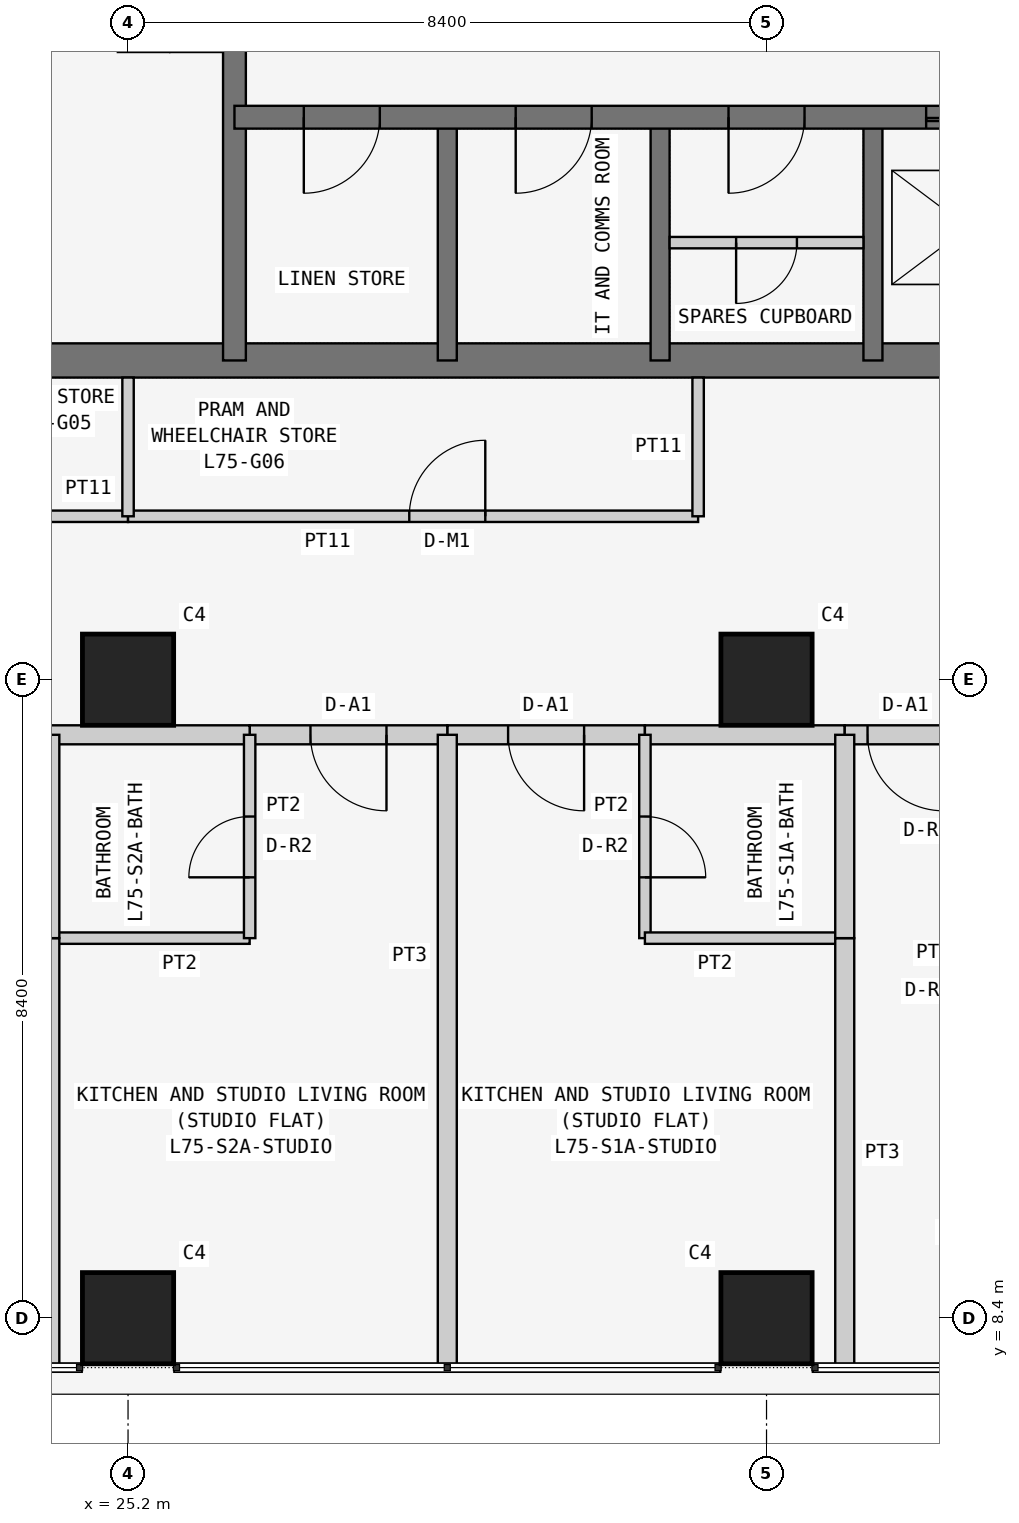
"""IFC4 building model, lengths in metres.
Left out: names, types, materials, properties, quantities, classifications, styles, units other than length and angle.
Written with IfcOpenShell. Run it as: python <this file> out.ifc"""

import sys

from ifc_helpers import new_model, si_unit, direction, frame, frame_2d, origin, origin_2d, place, context, subcontext, project, spatial, rectangle, extrude, element, fill, save


model = new_model("IFC4")
c1 = context("Model", 3, precision=1e-05, world=origin(), true_north=direction((0.0, 1.0)))
c2 = subcontext(c1, "Body", "Model", "MODEL_VIEW")
j1 = project(units=[si_unit("LENGTHUNIT", "METRE"), si_unit("PLANEANGLEUNIT", "RADIAN")], contexts=[c1])
p1 = place(None, origin())
s1 = spatial("IfcSite", under=j1, at=p1, CompositionType="ELEMENT")
p2 = place(p1, origin())
s2 = spatial("IfcBuilding", under=s1, at=p2, CompositionType="ELEMENT")
p3 = place(p2, frame((0.0, 0.0, 286.5)))
s3 = spatial("IfcBuildingStorey", under=s2, at=p3, CompositionType="ELEMENT", Elevation=286.5)
for number, where, z_axis, x_axis in (
    (1, (25.2, 8.4, 0.0), (0.0, 0.0, 1.0), (1.0, 0.0, 0.0)),
    (2, (25.2, 16.8, 0.0), (0.0, 0.0, 1.0), (1.0, 0.0, 0.0)),
    (3, (33.6, 8.4, 0.0), (0.0, 0.0, 1.0), (1.0, 0.0, 0.0)),
    (4, (33.6, 16.8, 0.0), (0.0, 0.0, 1.0), (1.0, 0.0, 0.0)),
):
    element("IfcColumn", number, at=place(p3, frame(where, z_axis=z_axis, x_axis=x_axis)), inside=s3, PredefinedType="COLUMN", context=c2, shape_type="SweptSolid", body=[
        extrude(rectangle(XDim=1.2, YDim=1.2, at=origin_2d()), origin(), (0.0, 0.0, 1.0), 3.6),
    ])
p4 = place(p3, frame((21.0, 21.0, 0.0), z_axis=(0.0, 0.0, 1.0), x_axis=(1.0, 0.0, 0.0)))
e5 = element("IfcWall", 5, at=p4, inside=s3, PredefinedType="SHEAR", context=c2, shape_type="SweptSolid", body=[
    extrude(rectangle(XDim=17.025, YDim=0.45, at=frame_2d((8.512, 0.0))), origin(), (0.0, 0.0, 1.0), 3.6),
])
p5 = place(p3, frame((26.6, 21.0, 0.0), z_axis=(0.0, 0.0, 1.0), x_axis=(0.0, 1.0, 0.0)))
e6 = element("IfcWall", 6, at=p5, inside=s3, PredefinedType="SHEAR", context=c2, shape_type="SweptSolid", body=[
    extrude(rectangle(XDim=16.8, YDim=0.3, at=frame_2d((8.4, 0.0))), origin(), (0.0, 0.0, 1.0), 3.6),
])
p6 = place(p5, frame((10.4, 0.0, 0.0)))
e7 = element("IfcOpeningElement", 7, at=p6, cuts=e6, PredefinedType="OPENING", context=c2, shape_type="SweptSolid", body=[
    extrude(rectangle(XDim=1.2, YDim=2.1, at=frame_2d((0.6, 1.05))), frame((0.0, 0.16, 0.0), z_axis=(0.0, -1.0, 0.0), x_axis=(1.0, 0.0, 0.0)), (0.0, 0.0, 1.0), 0.32),
])
p7 = place(p3, frame((26.6, 24.2, 0.0), z_axis=(0.0, 0.0, 1.0), x_axis=(1.0, 0.0, 0.0)))
e8 = element("IfcWall", 8, at=p7, inside=s3, PredefinedType="SHEAR", context=c2, shape_type="SweptSolid", body=[
    extrude(rectangle(XDim=11.2, YDim=0.3, at=frame_2d((5.6, 0.0))), origin(), (0.0, 0.0, 1.0), 3.6),
])
p8 = place(p7, frame((0.913, 0.0, 0.0)))
e9 = element("IfcOpeningElement", 9, at=p8, cuts=e8, PredefinedType="OPENING", context=c2, shape_type="SweptSolid", body=[
    extrude(rectangle(XDim=1.0, YDim=2.1, at=frame_2d((0.5, 1.05))), frame((0.0, 0.16, 0.0), z_axis=(0.0, -1.0, 0.0), x_axis=(1.0, 0.0, 0.0)), (0.0, 0.0, 1.0), 0.32),
])
p9 = place(p7, frame((3.7, 0.0, 0.0)))
e10 = element("IfcOpeningElement", 10, at=p9, cuts=e8, PredefinedType="OPENING", context=c2, shape_type="SweptSolid", body=[
    extrude(rectangle(XDim=1.0, YDim=2.1, at=frame_2d((0.5, 1.05))), frame((0.0, 0.16, 0.0), z_axis=(0.0, -1.0, 0.0), x_axis=(1.0, 0.0, 0.0)), (0.0, 0.0, 1.0), 0.32),
])
p10 = place(p7, frame((6.5, 0.0, 0.0)))
e11 = element("IfcOpeningElement", 11, at=p10, cuts=e8, PredefinedType="OPENING", context=c2, shape_type="SweptSolid", body=[
    extrude(rectangle(XDim=1.0, YDim=2.1, at=frame_2d((0.5, 1.05))), frame((0.0, 0.16, 0.0), z_axis=(0.0, -1.0, 0.0), x_axis=(1.0, 0.0, 0.0)), (0.0, 0.0, 1.0), 0.32),
])
p11 = place(p7, frame((9.1, 0.0, 0.0)))
e12 = element("IfcOpeningElement", 12, at=p11, cuts=e8, PredefinedType="OPENING", context=c2, shape_type="SweptSolid", body=[
    extrude(rectangle(XDim=1.1, YDim=2.1, at=frame_2d((0.55, 1.05))), frame((0.0, 0.16, 0.0), z_axis=(0.0, -1.0, 0.0), x_axis=(1.0, 0.0, 0.0)), (0.0, 0.0, 1.0), 0.32),
])
for number, where, z_axis, x_axis in (
    (13, (29.4, 21.0, 0.0), (0.0, 0.0, 1.0), (0.0, 1.0, 0.0)),
    (14, (32.2, 21.0, 0.0), (0.0, 0.0, 1.0), (0.0, 1.0, 0.0)),
    (15, (35.0, 21.0, 0.0), (0.0, 0.0, 1.0), (0.0, 1.0, 0.0)),
):
    element("IfcWall", number, at=place(p3, frame(where, z_axis=z_axis, x_axis=x_axis)), inside=s3, PredefinedType="SHEAR", context=c2, shape_type="SweptSolid", body=[
        extrude(rectangle(XDim=3.2, YDim=0.25, at=frame_2d((1.6, 0.0))), origin(), (0.0, 0.0, 1.0), 3.6),
    ])
p12 = place(p3, frame((20.775, 18.95, 0.0), z_axis=(0.0, 0.0, 1.0), x_axis=(1.0, 0.0, 0.0)))
e16 = element("IfcWall", 16, at=p12, inside=s3, PredefinedType="PARTITIONING", context=c2, shape_type="SweptSolid", body=[
    extrude(rectangle(XDim=4.425, YDim=0.15, at=frame_2d((2.212, 0.0))), origin(), (0.0, 0.0, 1.0), 3.45),
])
p13 = place(p12, frame((1.262, 0.0, 0.0)))
e17 = element("IfcOpeningElement", 17, at=p13, cuts=e16, PredefinedType="OPENING", context=c2, shape_type="SweptSolid", body=[
    extrude(rectangle(XDim=1.0, YDim=2.1, at=frame_2d((0.5, 1.05))), frame((0.0, 0.085, 0.0), z_axis=(0.0, -1.0, 0.0), x_axis=(1.0, 0.0, 0.0)), (0.0, 0.0, 1.0), 0.17),
])
p14 = place(p3, frame((25.2, 18.95, 0.0), z_axis=(0.0, 0.0, 1.0), x_axis=(1.0, 0.0, 0.0)))
e18 = element("IfcWall", 18, at=p14, inside=s3, PredefinedType="PARTITIONING", context=c2, shape_type="SweptSolid", body=[
    extrude(rectangle(XDim=7.5, YDim=0.15, at=frame_2d((3.75, 0.0))), origin(), (0.0, 0.0, 1.0), 3.45),
])
p15 = place(p14, frame((3.7, 0.0, 0.0)))
e19 = element("IfcOpeningElement", 19, at=p15, cuts=e18, PredefinedType="OPENING", context=c2, shape_type="SweptSolid", body=[
    extrude(rectangle(XDim=1.0, YDim=2.1, at=frame_2d((0.5, 1.05))), frame((0.0, 0.085, 0.0), z_axis=(0.0, -1.0, 0.0), x_axis=(1.0, 0.0, 0.0)), (0.0, 0.0, 1.0), 0.17),
])
p16 = place(p3, frame((32.7, 18.95, 0.0), z_axis=(0.0, 0.0, 1.0), x_axis=(0.0, 1.0, 0.0)))
e20 = element("IfcWall", 20, at=p16, inside=s3, PredefinedType="PARTITIONING", context=c2, shape_type="SweptSolid", body=[
    extrude(rectangle(XDim=1.825, YDim=0.15, at=frame_2d((0.913, 0.0))), origin(), (0.0, 0.0, 1.0), 3.45),
])
p17 = place(p3, frame((32.0, 16.075, 0.0), z_axis=(0.0, 0.0, 1.0), x_axis=(-1.0, 0.0, 0.0)))
e21 = element("IfcWall", 21, at=p17, inside=s3, PredefinedType="PARTITIONING", context=c2, shape_type="SweptSolid", body=[
    extrude(rectangle(XDim=2.6, YDim=0.25, at=frame_2d((1.3, 0.0))), origin(), (0.0, 0.0, 1.0), 3.45),
])
p18 = place(p17, frame((0.8, 0.0, 0.0)))
e22 = element("IfcOpeningElement", 22, at=p18, cuts=e21, PredefinedType="OPENING", context=c2, shape_type="SweptSolid", body=[
    extrude(rectangle(XDim=1.0, YDim=2.1, at=frame_2d((0.5, 1.05))), frame((0.0, 0.135, 0.0), z_axis=(0.0, -1.0, 0.0), x_axis=(1.0, 0.0, 0.0)), (0.0, 0.0, 1.0), 0.27),
])
p19 = place(p3, frame((34.629, 16.075, 0.0), z_axis=(0.0, 0.0, 1.0), x_axis=(-1.0, 0.0, 0.0)))
e23 = element("IfcWall", 23, at=p19, inside=s3, PredefinedType="PARTITIONING", context=c2, shape_type="SweptSolid", body=[
    extrude(rectangle(XDim=2.629, YDim=0.25, at=frame_2d((1.314, 0.0))), origin(), (0.0, 0.0, 1.0), 3.45),
])
p20 = place(p3, frame((36.229, 16.075, 0.0), z_axis=(0.0, 0.0, 1.0), x_axis=(-1.0, 0.0, 0.0)))
e24 = element("IfcWall", 24, at=p20, inside=s3, PredefinedType="PARTITIONING", context=c2, shape_type="SweptSolid", body=[
    extrude(rectangle(XDim=1.6, YDim=0.25, at=frame_2d((0.8, 0.0))), origin(), (0.0, 0.0, 1.0), 3.45),
])
p21 = place(p20, frame((0.3, 0.0, 0.0)))
e25 = element("IfcOpeningElement", 25, at=p21, cuts=e24, PredefinedType="OPENING", context=c2, shape_type="SweptSolid", body=[
    extrude(rectangle(XDim=1.0, YDim=2.1, at=frame_2d((0.5, 1.05))), frame((0.0, 0.135, 0.0), z_axis=(0.0, -1.0, 0.0), x_axis=(1.0, 0.0, 0.0)), (0.0, 0.0, 1.0), 0.27),
])
p22 = place(p3, frame((29.4, 16.075, 0.0), z_axis=(0.0, 0.0, 1.0), x_axis=(-1.0, 0.0, 0.0)))
e26 = element("IfcWall", 26, at=p22, inside=s3, PredefinedType="PARTITIONING", context=c2, shape_type="SweptSolid", body=[
    extrude(rectangle(XDim=2.6, YDim=0.25, at=frame_2d((1.3, 0.0))), origin(), (0.0, 0.0, 1.0), 3.45),
])
p23 = place(p22, frame((0.8, 0.0, 0.0)))
e27 = element("IfcOpeningElement", 27, at=p23, cuts=e26, PredefinedType="OPENING", context=c2, shape_type="SweptSolid", body=[
    extrude(rectangle(XDim=1.0, YDim=2.1, at=frame_2d((0.5, 1.05))), frame((0.0, 0.135, 0.0), z_axis=(0.0, -1.0, 0.0), x_axis=(1.0, 0.0, 0.0)), (0.0, 0.0, 1.0), 0.27),
])
p24 = place(p3, frame((26.8, 16.075, 0.0), z_axis=(0.0, 0.0, 1.0), x_axis=(-1.0, 0.0, 0.0)))
e28 = element("IfcWall", 28, at=p24, inside=s3, PredefinedType="PARTITIONING", context=c2, shape_type="SweptSolid", body=[
    extrude(rectangle(XDim=2.629, YDim=0.25, at=frame_2d((1.314, 0.0))), origin(), (0.0, 0.0, 1.0), 3.45),
])
p25 = place(p3, frame((25.2, 18.95, 0.0), z_axis=(0.0, 0.0, 1.0), x_axis=(0.0, 1.0, 0.0)))
e29 = element("IfcWall", 29, at=p25, inside=s3, PredefinedType="PARTITIONING", context=c2, shape_type="SweptSolid", body=[
    extrude(rectangle(XDim=1.825, YDim=0.15, at=frame_2d((0.913, 0.0))), origin(), (0.0, 0.0, 1.0), 2.767),
])
p26 = place(p3, frame((32.0, 16.075, 0.0), z_axis=(0.0, 0.0, 1.0), x_axis=(0.0, -1.0, 0.0)))
e30 = element("IfcWall", 30, at=p26, inside=s3, PredefinedType="PARTITIONING", context=c2, shape_type="SweptSolid", body=[
    extrude(rectangle(XDim=2.675, YDim=0.15, at=frame_2d((1.337, 0.0))), origin(), (0.0, 0.0, 1.0), 3.45),
])
p27 = place(p26, frame((1.075, 0.0, 0.0)))
e31 = element("IfcOpeningElement", 31, at=p27, cuts=e30, PredefinedType="OPENING", context=c2, shape_type="SweptSolid", body=[
    extrude(rectangle(XDim=0.8, YDim=2.1, at=frame_2d((0.4, 1.05))), frame((0.0, 0.085, 0.0), z_axis=(0.0, -1.0, 0.0), x_axis=(1.0, 0.0, 0.0)), (0.0, 0.0, 1.0), 0.17),
])
p28 = place(p3, frame((32.0, 13.4, 0.0), z_axis=(0.0, 0.0, 1.0), x_axis=(1.0, 0.0, 0.0)))
e32 = element("IfcWall", 32, at=p28, inside=s3, PredefinedType="PARTITIONING", context=c2, shape_type="SweptSolid", body=[
    extrude(rectangle(XDim=2.629, YDim=0.15, at=frame_2d((1.314, 0.0))), origin(), (0.0, 0.0, 1.0), 3.45),
])
p29 = place(p3, frame((34.629, 13.4, 0.0), z_axis=(0.0, 0.0, 1.0), x_axis=(0.0, -1.0, 0.0)))
e33 = element("IfcWall", 33, at=p29, inside=s3, PredefinedType="PARTITIONING", context=c2, shape_type="SweptSolid", body=[
    extrude(rectangle(XDim=5.65, YDim=0.25, at=frame_2d((2.825, 0.0))), origin(), (0.0, 0.0, 1.0), 3.45),
])
p30 = place(p3, frame((29.4, 7.75, 0.0), z_axis=(0.0, 0.0, 1.0), x_axis=(0.0, 1.0, 0.0)))
e34 = element("IfcWall", 34, at=p30, inside=s3, PredefinedType="PARTITIONING", context=c2, shape_type="SweptSolid", body=[
    extrude(rectangle(XDim=8.325, YDim=0.25, at=frame_2d((4.163, 0.0))), origin(), (0.0, 0.0, 1.0), 2.848),
])
p31 = place(p3, frame((34.629, 13.4, 0.0), z_axis=(0.0, 0.0, 1.0), x_axis=(0.0, 1.0, 0.0)))
e35 = element("IfcWall", 35, at=p31, inside=s3, PredefinedType="PARTITIONING", context=c2, shape_type="SweptSolid", body=[
    extrude(rectangle(XDim=2.675, YDim=0.25, at=frame_2d((1.337, 0.0))), origin(), (0.0, 0.0, 1.0), 3.45),
])
p32 = place(p3, frame((24.171, 13.4, 0.0), z_axis=(0.0, 0.0, 1.0), x_axis=(1.0, 0.0, 0.0)))
e36 = element("IfcWall", 36, at=p32, inside=s3, PredefinedType="PARTITIONING", context=c2, shape_type="SweptSolid", body=[
    extrude(rectangle(XDim=2.629, YDim=0.15, at=frame_2d((1.314, 0.0))), origin(), (0.0, 0.0, 1.0), 3.45),
])
p33 = place(p3, frame((26.8, 13.4, 0.0), z_axis=(0.0, 0.0, 1.0), x_axis=(0.0, 1.0, 0.0)))
e37 = element("IfcWall", 37, at=p33, inside=s3, PredefinedType="PARTITIONING", context=c2, shape_type="SweptSolid", body=[
    extrude(rectangle(XDim=2.675, YDim=0.15, at=frame_2d((1.337, 0.0))), origin(), (0.0, 0.0, 1.0), 3.45),
])
p34 = place(p33, frame((0.8, 0.0, 0.0)))
e38 = element("IfcOpeningElement", 38, at=p34, cuts=e37, PredefinedType="OPENING", context=c2, shape_type="SweptSolid", body=[
    extrude(rectangle(XDim=0.8, YDim=2.1, at=frame_2d((0.4, 1.05))), frame((0.0, 0.085, 0.0), z_axis=(0.0, -1.0, 0.0), x_axis=(1.0, 0.0, 0.0)), (0.0, 0.0, 1.0), 0.17),
])
p35 = place(p3, frame((24.171, 7.75, 0.0), z_axis=(0.0, 0.0, 1.0), x_axis=(0.0, 1.0, 0.0)))
e39 = element("IfcWall", 39, at=p35, inside=s3, PredefinedType="PARTITIONING", context=c2, shape_type="SweptSolid", body=[
    extrude(rectangle(XDim=5.65, YDim=0.25, at=frame_2d((2.825, 0.0))), origin(), (0.0, 0.0, 1.0), 3.45),
])
p36 = place(p3, frame((24.171, 13.4, 0.0), z_axis=(0.0, 0.0, 1.0), x_axis=(0.0, 1.0, 0.0)))
e40 = element("IfcWall", 40, at=p36, inside=s3, PredefinedType="PARTITIONING", context=c2, shape_type="SweptSolid", body=[
    extrude(rectangle(XDim=2.675, YDim=0.25, at=frame_2d((1.337, 0.0))), origin(), (0.0, 0.0, 1.0), 3.45),
])
p37 = place(p3, frame((32.325, 22.55, 0.0), z_axis=(0.0, 0.0, 1.0), x_axis=(1.0, 0.0, 0.0)))
e41 = element("IfcWall", 41, at=p37, inside=s3, PredefinedType="PARTITIONING", context=c2, shape_type="SweptSolid", body=[
    extrude(rectangle(XDim=2.55, YDim=0.15, at=frame_2d((1.275, 0.0))), origin(), (0.0, 0.0, 1.0), 3.45),
])
p38 = place(p37, frame((0.875, 0.0, 0.0)))
e42 = element("IfcOpeningElement", 42, at=p38, cuts=e41, PredefinedType="OPENING", context=c2, shape_type="SweptSolid", body=[
    extrude(rectangle(XDim=0.8, YDim=2.1, at=frame_2d((0.4, 1.05))), frame((0.0, 0.085, 0.0), z_axis=(0.0, -1.0, 0.0), x_axis=(1.0, 0.0, 0.0)), (0.0, 0.0, 1.0), 0.17),
])
p39 = place(p15, origin())
e43 = element("IfcDoor", 43, at=p39, inside=s3, OperationType="SINGLE_SWING_RIGHT", PredefinedType="DOOR", context=c2, shape_type="SweptSolid", body=[
    extrude(rectangle(XDim=1.0, YDim=2.1, at=frame_2d((0.5, 1.05))), frame((0.0, 0.025, 0.0), z_axis=(0.0, -1.0, 0.0), x_axis=(1.0, 0.0, 0.0)), (0.0, 0.0, 1.0), 0.05),
])
fill(e19, e43)
p40 = place(p18, origin())
e44 = element("IfcDoor", 44, at=p40, inside=s3, OperationType="SINGLE_SWING_LEFT", PredefinedType="DOOR", context=c2, shape_type="SweptSolid", body=[
    extrude(rectangle(XDim=1.0, YDim=2.1, at=frame_2d((0.5, 1.05))), frame((0.0, 0.025, 0.0), z_axis=(0.0, -1.0, 0.0), x_axis=(1.0, 0.0, 0.0)), (0.0, 0.0, 1.0), 0.05),
])
fill(e22, e44)
p41 = place(p27, origin())
e45 = element("IfcDoor", 45, at=p41, inside=s3, OperationType="SINGLE_SWING_RIGHT", PredefinedType="DOOR", context=c2, shape_type="SweptSolid", body=[
    extrude(rectangle(XDim=0.8, YDim=2.1, at=frame_2d((0.4, 1.05))), frame((0.0, 0.025, 0.0), z_axis=(0.0, -1.0, 0.0), x_axis=(1.0, 0.0, 0.0)), (0.0, 0.0, 1.0), 0.05),
])
fill(e31, e45)
p42 = place(p21, origin())
e46 = element("IfcDoor", 46, at=p42, inside=s3, OperationType="SINGLE_SWING_LEFT", PredefinedType="DOOR", context=c2, shape_type="SweptSolid", body=[
    extrude(rectangle(XDim=1.0, YDim=2.1, at=frame_2d((0.5, 1.05))), frame((0.0, 0.025, 0.0), z_axis=(0.0, -1.0, 0.0), x_axis=(1.0, 0.0, 0.0)), (0.0, 0.0, 1.0), 0.05),
])
fill(e25, e46)
p43 = place(p23, origin())
e47 = element("IfcDoor", 47, at=p43, inside=s3, OperationType="SINGLE_SWING_LEFT", PredefinedType="DOOR", context=c2, shape_type="SweptSolid", body=[
    extrude(rectangle(XDim=1.0, YDim=2.1, at=frame_2d((0.5, 1.05))), frame((0.0, 0.025, 0.0), z_axis=(0.0, -1.0, 0.0), x_axis=(1.0, 0.0, 0.0)), (0.0, 0.0, 1.0), 0.05),
])
fill(e27, e47)
p44 = place(p34, origin())
e48 = element("IfcDoor", 48, at=p44, inside=s3, OperationType="SINGLE_SWING_LEFT", PredefinedType="DOOR", context=c2, shape_type="SweptSolid", body=[
    extrude(rectangle(XDim=0.8, YDim=2.1, at=frame_2d((0.4, 1.05))), frame((0.0, 0.025, 0.0), z_axis=(0.0, -1.0, 0.0), x_axis=(1.0, 0.0, 0.0)), (0.0, 0.0, 1.0), 0.05),
])
fill(e38, e48)
p45 = place(p8, frame((1.0, 0.0, 0.0), z_axis=(0.0, 0.0, 1.0), x_axis=(-1.0, 0.0, 0.0)))
e49 = element("IfcDoor", 49, at=p45, inside=s3, OperationType="SINGLE_SWING_RIGHT", PredefinedType="DOOR", context=c2, shape_type="SweptSolid", body=[
    extrude(rectangle(XDim=1.0, YDim=2.1, at=frame_2d((0.5, 1.05))), frame((0.0, 0.025, 0.0), z_axis=(0.0, -1.0, 0.0), x_axis=(1.0, 0.0, 0.0)), (0.0, 0.0, 1.0), 0.05),
])
fill(e9, e49)
p46 = place(p9, frame((1.0, 0.0, 0.0), z_axis=(0.0, 0.0, 1.0), x_axis=(-1.0, 0.0, 0.0)))
e50 = element("IfcDoor", 50, at=p46, inside=s3, OperationType="SINGLE_SWING_RIGHT", PredefinedType="DOOR", context=c2, shape_type="SweptSolid", body=[
    extrude(rectangle(XDim=1.0, YDim=2.1, at=frame_2d((0.5, 1.05))), frame((0.0, 0.025, 0.0), z_axis=(0.0, -1.0, 0.0), x_axis=(1.0, 0.0, 0.0)), (0.0, 0.0, 1.0), 0.05),
])
fill(e10, e50)
p47 = place(p10, frame((1.0, 0.0, 0.0), z_axis=(0.0, 0.0, 1.0), x_axis=(-1.0, 0.0, 0.0)))
e51 = element("IfcDoor", 51, at=p47, inside=s3, OperationType="SINGLE_SWING_RIGHT", PredefinedType="DOOR", context=c2, shape_type="SweptSolid", body=[
    extrude(rectangle(XDim=1.0, YDim=2.1, at=frame_2d((0.5, 1.05))), frame((0.0, 0.025, 0.0), z_axis=(0.0, -1.0, 0.0), x_axis=(1.0, 0.0, 0.0)), (0.0, 0.0, 1.0), 0.05),
])
fill(e11, e51)
p48 = place(p38, frame((0.8, 0.0, 0.0), z_axis=(0.0, 0.0, 1.0), x_axis=(-1.0, 0.0, 0.0)))
e52 = element("IfcDoor", 52, at=p48, inside=s3, OperationType="SINGLE_SWING_RIGHT", PredefinedType="DOOR", context=c2, shape_type="SweptSolid", body=[
    extrude(rectangle(XDim=0.8, YDim=2.1, at=frame_2d((0.4, 1.05))), frame((0.0, 0.025, 0.0), z_axis=(0.0, -1.0, 0.0), x_axis=(1.0, 0.0, 0.0)), (0.0, 0.0, 1.0), 0.05),
])
fill(e42, e52)
p49 = place(p11, origin())
e53 = element("IfcDoor", 53, at=p49, inside=s3, OperationType="DOUBLE_DOOR_SLIDING", PredefinedType="DOOR", context=c2, shape_type="SweptSolid", body=[
    extrude(rectangle(XDim=1.1, YDim=2.1, at=frame_2d((0.55, 1.05))), frame((0.0, 0.025, 0.0), z_axis=(0.0, -1.0, 0.0), x_axis=(1.0, 0.0, 0.0)), (0.0, 0.0, 1.0), 0.05),
])
fill(e12, e53)
save(model, sys.argv[1])
